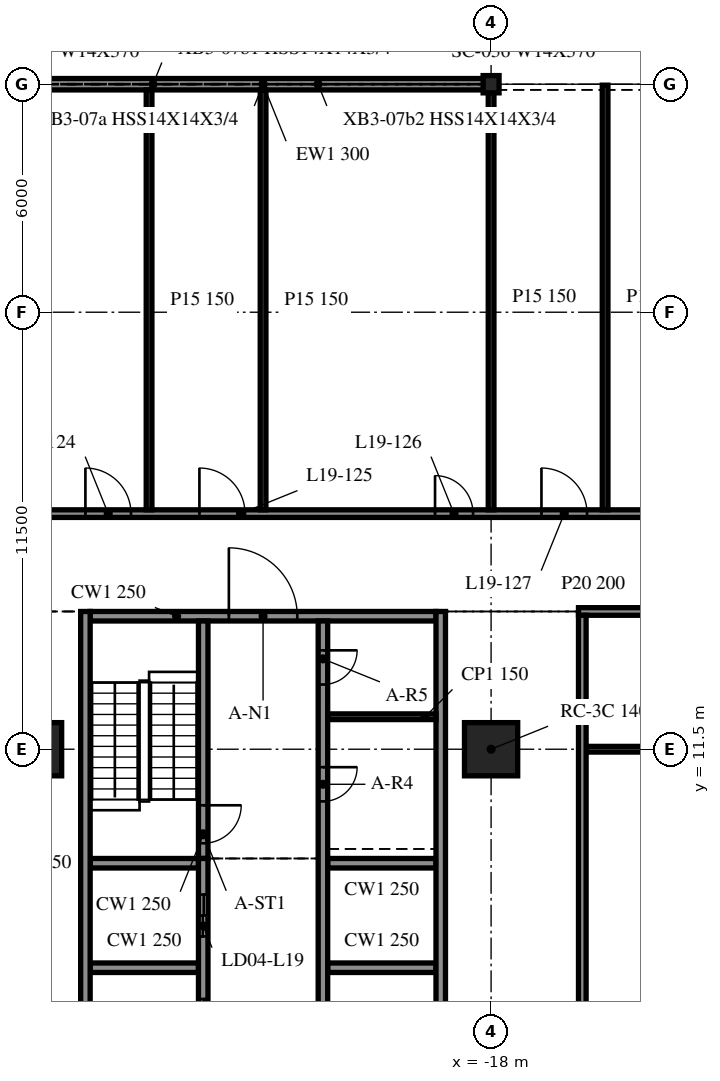
"""IFC4 building model, lengths in metres.
Left out: names, types, materials, properties, quantities, classifications, styles, units other than length and angle.
Written with IfcOpenShell. Run it as: python <this file> out.ifc"""

import sys

from ifc_helpers import new_model, si_unit, direction, frame, frame_2d, origin, origin_2d, place, context, subcontext, project, spatial, rectangle, i_section, extrude, element, fill, save


model = new_model("IFC4")
c1 = context("Model", 3, precision=1e-05, world=origin(), true_north=direction((0.0, 1.0)))
c2 = subcontext(c1, "Body", "Model", "MODEL_VIEW")
j1 = project(units=[si_unit("LENGTHUNIT", "METRE"), si_unit("PLANEANGLEUNIT", "RADIAN")], contexts=[c1])
p1 = place(None, origin())
s1 = spatial("IfcSite", under=j1, at=p1, CompositionType="ELEMENT")
p2 = place(p1, origin())
s2 = spatial("IfcBuilding", under=s1, at=p2, CompositionType="ELEMENT")
p3 = place(p2, frame((0.0, 0.0, 84.8)))
s3 = spatial("IfcBuildingStorey", under=s2, at=p3, CompositionType="ELEMENT", Elevation=84.8)
for number, where, z_axis, x_axis in (
    (1, (-30.0, 11.5, -0.34), (0.0, 0.0, 1.0), (1.0, 0.0, 0.0)),
    (2, (-18.0, 11.5, -0.34), (0.0, 0.0, 1.0), (1.0, 0.0, 0.0)),
):
    element("IfcColumn", number, at=place(p3, frame(where, z_axis=z_axis, x_axis=x_axis)), inside=s3, PredefinedType="COLUMN", context=c2, shape_type="SweptSolid", body=[
        extrude(rectangle(XDim=1.4, YDim=1.4, at=origin_2d()), origin(), (0.0, 0.0, 1.0), 4.1),
    ])
p4 = place(p3, frame((-18.0, 29.0, -0.34), z_axis=(0.0, 0.0, 1.0), x_axis=(1.0, 0.0, 0.0)))
e3 = element("IfcColumn", 3, at=p4, inside=s3, PredefinedType="COLUMN", context=c2, shape_type="SweptSolid", body=[
    extrude(i_section(OverallWidth=0.419, OverallDepth=0.455, WebThickness=0.042, FlangeThickness=0.068, at=origin_2d()), origin(), (0.0, 0.0, 1.0), 4.1),
])
p5 = place(p3, frame((-18.021, 29.0, 0.0), z_axis=(0.0, 0.0, 1.0), x_axis=(-1.0, 0.0, 0.0)))
e4 = element("IfcWall", 4, at=p5, inside=s3, PredefinedType="NOTDEFINED", context=c2, shape_type="SweptSolid", body=[
    extrude(rectangle(XDim=11.958, YDim=0.3, at=frame_2d((5.979, 0.0))), origin(), (0.0, 0.0, 1.0), 3.003),
])
for number, where, z_axis, x_axis in (
    (5, (-28.675, 15.125, 0.0), (0.0, 0.0, 1.0), (0.0, -1.0, 0.0)),
    (6, (-19.325, -9.125, 0.0), (0.0, 0.0, 1.0), (0.0, 1.0, 0.0)),
):
    element("IfcWall", number, at=place(p3, frame(where, z_axis=z_axis, x_axis=x_axis)), inside=s3, PredefinedType="SOLIDWALL", context=c2, shape_type="SweptSolid", body=[
        extrude(rectangle(XDim=24.25, YDim=0.25, at=frame_2d((12.125, 0.0))), origin(), (0.0, 0.0, 1.0), 3.76),
    ])
p6 = place(p3, frame((-28.55, 15.0, 0.0), z_axis=(0.0, 0.0, 1.0), x_axis=(1.0, 0.0, 0.0)))
e7 = element("IfcWall", 7, at=p6, inside=s3, PredefinedType="SOLIDWALL", context=c2, shape_type="SweptSolid", body=[
    extrude(rectangle(XDim=9.1, YDim=0.25, at=frame_2d((4.55, 0.0))), origin(), (0.0, 0.0, 1.0), 3.76),
])
p7 = place(p6, frame((3.65, 0.0, 0.0)))
e8 = element("IfcOpeningElement", 8, at=p7, cuts=e7, PredefinedType="OPENING", context=c2, shape_type="SweptSolid", body=[
    extrude(rectangle(XDim=1.8, YDim=2.1, at=frame_2d((0.9, 1.05))), frame((0.0, 0.135, 0.0), z_axis=(0.0, -1.0, 0.0), x_axis=(1.0, 0.0, 0.0)), (0.0, 0.0, 1.0), 0.27),
])
p8 = place(p3, frame((-25.575, -8.875, 0.0), z_axis=(0.0, 0.0, 1.0), x_axis=(0.0, 1.0, 0.0)))
e9 = element("IfcWall", 9, at=p8, inside=s3, PredefinedType="SOLIDWALL", context=c2, shape_type="SweptSolid", body=[
    extrude(rectangle(XDim=17.5, YDim=0.25, at=frame_2d((8.75, 0.0))), origin(), (0.0, 0.0, 1.0), 3.76),
])
p9 = place(p8, frame((7.2, 0.0, 0.0)))
e10 = element("IfcOpeningElement", 10, at=p9, cuts=e9, PredefinedType="OPENING", context=c2, shape_type="SweptSolid", body=[
    extrude(rectangle(XDim=1.1, YDim=2.1, at=frame_2d((0.55, 1.05))), frame((0.0, 0.135, 0.0), z_axis=(0.0, -1.0, 0.0), x_axis=(1.0, 0.0, 0.0)), (0.0, 0.0, 1.0), 0.27),
])
p10 = place(p8, frame((9.95, 0.0, 0.0)))
e11 = element("IfcOpeningElement", 11, at=p10, cuts=e9, PredefinedType="OPENING", context=c2, shape_type="SweptSolid", body=[
    extrude(rectangle(XDim=1.1, YDim=2.1, at=frame_2d((0.55, 1.05))), frame((0.0, 0.135, 0.0), z_axis=(0.0, -1.0, 0.0), x_axis=(1.0, 0.0, 0.0)), (0.0, 0.0, 1.0), 0.27),
])
p11 = place(p8, frame((12.7, 0.0, 0.0)))
e12 = element("IfcOpeningElement", 12, at=p11, cuts=e9, PredefinedType="OPENING", context=c2, shape_type="SweptSolid", body=[
    extrude(rectangle(XDim=1.1, YDim=2.1, at=frame_2d((0.55, 1.05))), frame((0.0, 0.135, 0.0), z_axis=(0.0, -1.0, 0.0), x_axis=(1.0, 0.0, 0.0)), (0.0, 0.0, 1.0), 0.27),
])
p12 = place(p8, frame((15.45, 0.0, 0.0)))
e13 = element("IfcOpeningElement", 13, at=p12, cuts=e9, PredefinedType="OPENING", context=c2, shape_type="SweptSolid", body=[
    extrude(rectangle(XDim=1.1, YDim=2.1, at=frame_2d((0.55, 1.05))), frame((0.0, 0.135, 0.0), z_axis=(0.0, -1.0, 0.0), x_axis=(1.0, 0.0, 0.0)), (0.0, 0.0, 1.0), 0.27),
])
p13 = place(p8, frame((1.012, 0.0, 0.0)))
e14 = element("IfcOpeningElement", 14, at=p13, cuts=e9, PredefinedType="OPENING", context=c2, shape_type="SweptSolid", body=[
    extrude(rectangle(XDim=0.9, YDim=2.1, at=frame_2d((0.45, 1.05))), frame((0.0, 0.135, 0.0), z_axis=(0.0, -1.0, 0.0), x_axis=(1.0, 0.0, 0.0)), (0.0, 0.0, 1.0), 0.27),
])
p14 = place(p8, frame((4.087, 0.0, 0.0)))
e15 = element("IfcOpeningElement", 15, at=p14, cuts=e9, PredefinedType="OPENING", context=c2, shape_type="SweptSolid", body=[
    extrude(rectangle(XDim=0.9, YDim=2.1, at=frame_2d((0.45, 1.05))), frame((0.0, 0.135, 0.0), z_axis=(0.0, -1.0, 0.0), x_axis=(1.0, 0.0, 0.0)), (0.0, 0.0, 1.0), 0.27),
])
p15 = place(p3, frame((-25.575, 14.875, 0.0), z_axis=(0.0, 0.0, 1.0), x_axis=(0.0, -1.0, 0.0)))
e16 = element("IfcWall", 16, at=p15, inside=s3, PredefinedType="SOLIDWALL", context=c2, shape_type="SweptSolid", body=[
    extrude(rectangle(XDim=6.25, YDim=0.25, at=frame_2d((3.125, 0.0))), origin(), (0.0, 0.0, 1.0), 3.76),
])
p16 = place(p15, frame((4.85, 0.0, 0.0)))
e17 = element("IfcOpeningElement", 17, at=p16, cuts=e16, PredefinedType="OPENING", context=c2, shape_type="SweptSolid", body=[
    extrude(rectangle(XDim=1.0, YDim=2.1, at=frame_2d((0.5, 1.05))), frame((0.0, 0.135, 0.0), z_axis=(0.0, -1.0, 0.0), x_axis=(1.0, 0.0, 0.0)), (0.0, 0.0, 1.0), 0.27),
])
p17 = place(p3, frame((-22.425, 14.875, 0.0), z_axis=(0.0, 0.0, 1.0), x_axis=(0.0, -1.0, 0.0)))
e18 = element("IfcWall", 18, at=p17, inside=s3, PredefinedType="SOLIDWALL", context=c2, shape_type="SweptSolid", body=[
    extrude(rectangle(XDim=23.75, YDim=0.25, at=frame_2d((11.875, 0.0))), origin(), (0.0, 0.0, 1.0), 3.76),
])
p18 = place(p17, frame((15.45, 0.0, 0.0)))
e19 = element("IfcOpeningElement", 19, at=p18, cuts=e18, PredefinedType="OPENING", context=c2, shape_type="SweptSolid", body=[
    extrude(rectangle(XDim=1.1, YDim=2.1, at=frame_2d((0.55, 1.05))), frame((0.0, 0.135, 0.0), z_axis=(0.0, -1.0, 0.0), x_axis=(1.0, 0.0, 0.0)), (0.0, 0.0, 1.0), 0.27),
])
p19 = place(p17, frame((12.7, 0.0, 0.0)))
e20 = element("IfcOpeningElement", 20, at=p19, cuts=e18, PredefinedType="OPENING", context=c2, shape_type="SweptSolid", body=[
    extrude(rectangle(XDim=1.1, YDim=2.1, at=frame_2d((0.55, 1.05))), frame((0.0, 0.135, 0.0), z_axis=(0.0, -1.0, 0.0), x_axis=(1.0, 0.0, 0.0)), (0.0, 0.0, 1.0), 0.27),
])
p20 = place(p17, frame((20.3, 0.0, 0.0)))
e21 = element("IfcOpeningElement", 21, at=p20, cuts=e18, PredefinedType="OPENING", context=c2, shape_type="SweptSolid", body=[
    extrude(rectangle(XDim=0.9, YDim=2.1, at=frame_2d((0.45, 1.05))), frame((0.0, 0.135, 0.0), z_axis=(0.0, -1.0, 0.0), x_axis=(1.0, 0.0, 0.0)), (0.0, 0.0, 1.0), 0.27),
])
p21 = place(p17, frame((3.847, 0.0, 0.0)))
e22 = element("IfcOpeningElement", 22, at=p21, cuts=e18, PredefinedType="OPENING", context=c2, shape_type="SweptSolid", body=[
    extrude(rectangle(XDim=0.9, YDim=2.1, at=frame_2d((0.45, 1.05))), frame((0.0, 0.135, 0.0), z_axis=(0.0, -1.0, 0.0), x_axis=(1.0, 0.0, 0.0)), (0.0, 0.0, 1.0), 0.27),
])
p22 = place(p17, frame((0.772, 0.0, 0.0)))
e23 = element("IfcOpeningElement", 23, at=p22, cuts=e18, PredefinedType="OPENING", context=c2, shape_type="SweptSolid", body=[
    extrude(rectangle(XDim=0.9, YDim=2.1, at=frame_2d((0.45, 1.05))), frame((0.0, 0.135, 0.0), z_axis=(0.0, -1.0, 0.0), x_axis=(1.0, 0.0, 0.0)), (0.0, 0.0, 1.0), 0.27),
])
for number, where, z_axis, x_axis in (
    (24, (-28.55, 5.75, 0.0), (0.0, 0.0, 1.0), (1.0, 0.0, 0.0)),
    (25, (-28.55, 8.5, 0.0), (0.0, 0.0, 1.0), (1.0, 0.0, 0.0)),
    (26, (-22.3, 5.75, 0.0), (0.0, 0.0, 1.0), (1.0, 0.0, 0.0)),
    (27, (-22.3, 8.5, 0.0), (0.0, 0.0, 1.0), (1.0, 0.0, 0.0)),
):
    element("IfcWall", number, at=place(p3, frame(where, z_axis=z_axis, x_axis=x_axis)), inside=s3, PredefinedType="SOLIDWALL", context=c2, shape_type="SweptSolid", body=[
        extrude(rectangle(XDim=2.85, YDim=0.25, at=frame_2d((1.425, 0.0))), origin(), (0.0, 0.0, 1.0), 3.76),
    ])
p23 = place(p3, frame((-22.3, 12.355, 0.0), z_axis=(0.0, 0.0, 1.0), x_axis=(1.0, 0.0, 0.0)))
e28 = element("IfcWall", 28, at=p23, inside=s3, PredefinedType="PARTITIONING", context=c2, shape_type="SweptSolid", body=[
    extrude(rectangle(XDim=2.85, YDim=0.15, at=frame_2d((1.425, 0.0))), origin(), (0.0, 0.0, 1.0), 3.76),
])
p24 = place(p3, frame((-15.5, 11.5, 0.0), z_axis=(0.0, 0.0, 1.0), x_axis=(1.0, 0.0, 0.0)))
e29 = element("IfcWall", 29, at=p24, inside=s3, PredefinedType="PARTITIONING", context=c2, shape_type="SweptSolid", body=[
    extrude(rectangle(XDim=6.9, YDim=0.15, at=frame_2d((3.45, 0.0))), origin(), (0.0, 0.0, 1.0), 3.76),
])
p25 = place(p3, frame((-15.7, 15.125, 0.0), z_axis=(0.0, 0.0, 1.0), x_axis=(1.0, 0.0, 0.0)))
e30 = element("IfcWall", 30, at=p25, inside=s3, PredefinedType="PARTITIONING", context=c2, shape_type="SweptSolid", body=[
    extrude(rectangle(XDim=7.3, YDim=0.2, at=frame_2d((3.65, 0.0))), origin(), (0.0, 0.0, 1.0), 3.76),
])
p26 = place(p25, frame((3.1, 0.0, 0.0)))
e31 = element("IfcOpeningElement", 31, at=p26, cuts=e30, PredefinedType="OPENING", context=c2, shape_type="SweptSolid", body=[
    extrude(rectangle(XDim=0.9, YDim=2.1, at=frame_2d((0.45, 1.05))), frame((0.0, 0.11, 0.0), z_axis=(0.0, -1.0, 0.0), x_axis=(1.0, 0.0, 0.0)), (0.0, 0.0, 1.0), 0.22),
])
p27 = place(p3, frame((-41.975, 17.7, 0.0), z_axis=(0.0, 0.0, 1.0), x_axis=(1.0, 0.0, 0.0)))
e32 = element("IfcWall", 32, at=p27, inside=s3, PredefinedType="PARTITIONING", context=c2, shape_type="SweptSolid", body=[
    extrude(rectangle(XDim=95.95, YDim=0.2, at=frame_2d((47.975, 0.0))), origin(), (0.0, 0.0, 1.0), 3.76),
])
p28 = place(p27, frame((4.5, 0.0, 0.0)))
e33 = element("IfcOpeningElement", 33, at=p28, cuts=e32, PredefinedType="OPENING", context=c2, shape_type="SweptSolid", body=[
    extrude(rectangle(XDim=1.0, YDim=2.1, at=frame_2d((0.5, 1.05))), frame((0.0, 0.11, 0.0), z_axis=(0.0, -1.0, 0.0), x_axis=(1.0, 0.0, 0.0)), (0.0, 0.0, 1.0), 0.22),
])
p29 = place(p27, frame((13.3, 0.0, 0.0)))
e34 = element("IfcOpeningElement", 34, at=p29, cuts=e32, PredefinedType="OPENING", context=c2, shape_type="SweptSolid", body=[
    extrude(rectangle(XDim=1.2, YDim=2.1, at=frame_2d((0.6, 1.05))), frame((0.0, 0.11, 0.0), z_axis=(0.0, -1.0, 0.0), x_axis=(1.0, 0.0, 0.0)), (0.0, 0.0, 1.0), 0.22),
])
p30 = place(p27, frame((16.3, 0.0, 0.0)))
e35 = element("IfcOpeningElement", 35, at=p30, cuts=e32, PredefinedType="OPENING", context=c2, shape_type="SweptSolid", body=[
    extrude(rectangle(XDim=1.2, YDim=2.1, at=frame_2d((0.6, 1.05))), frame((0.0, 0.11, 0.0), z_axis=(0.0, -1.0, 0.0), x_axis=(1.0, 0.0, 0.0)), (0.0, 0.0, 1.0), 0.22),
])
p31 = place(p27, frame((22.5, 0.0, 0.0)))
e36 = element("IfcOpeningElement", 36, at=p31, cuts=e32, PredefinedType="OPENING", context=c2, shape_type="SweptSolid", body=[
    extrude(rectangle(XDim=1.0, YDim=2.1, at=frame_2d((0.5, 1.05))), frame((0.0, 0.11, 0.0), z_axis=(0.0, -1.0, 0.0), x_axis=(1.0, 0.0, 0.0)), (0.0, 0.0, 1.0), 0.22),
])
p32 = place(p27, frame((25.3, 0.0, 0.0)))
e37 = element("IfcOpeningElement", 37, at=p32, cuts=e32, PredefinedType="OPENING", context=c2, shape_type="SweptSolid", body=[
    extrude(rectangle(XDim=1.2, YDim=2.1, at=frame_2d((0.6, 1.05))), frame((0.0, 0.11, 0.0), z_axis=(0.0, -1.0, 0.0), x_axis=(1.0, 0.0, 0.0)), (0.0, 0.0, 1.0), 0.22),
])
p33 = place(p27, frame((34.3, 0.0, 0.0)))
e38 = element("IfcOpeningElement", 38, at=p33, cuts=e32, PredefinedType="OPENING", context=c2, shape_type="SweptSolid", body=[
    extrude(rectangle(XDim=1.2, YDim=2.1, at=frame_2d((0.6, 1.05))), frame((0.0, 0.11, 0.0), z_axis=(0.0, -1.0, 0.0), x_axis=(1.0, 0.0, 0.0)), (0.0, 0.0, 1.0), 0.22),
])
p34 = place(p27, frame((42.7, 0.0, 0.0)))
e39 = element("IfcOpeningElement", 39, at=p34, cuts=e32, PredefinedType="OPENING", context=c2, shape_type="SweptSolid", body=[
    extrude(rectangle(XDim=1.0, YDim=2.1, at=frame_2d((0.5, 1.05))), frame((0.0, 0.11, 0.0), z_axis=(0.0, -1.0, 0.0), x_axis=(1.0, 0.0, 0.0)), (0.0, 0.0, 1.0), 0.22),
])
p35 = place(p27, frame((47.3, 0.0, 0.0)))
e40 = element("IfcOpeningElement", 40, at=p35, cuts=e32, PredefinedType="OPENING", context=c2, shape_type="SweptSolid", body=[
    extrude(rectangle(XDim=1.2, YDim=2.1, at=frame_2d((0.6, 1.05))), frame((0.0, 0.11, 0.0), z_axis=(0.0, -1.0, 0.0), x_axis=(1.0, 0.0, 0.0)), (0.0, 0.0, 1.0), 0.22),
])
p36 = place(p27, frame((51.1, 0.0, 0.0)))
e41 = element("IfcOpeningElement", 41, at=p36, cuts=e32, PredefinedType="OPENING", context=c2, shape_type="SweptSolid", body=[
    extrude(rectangle(XDim=1.2, YDim=2.1, at=frame_2d((0.6, 1.05))), frame((0.0, 0.11, 0.0), z_axis=(0.0, -1.0, 0.0), x_axis=(1.0, 0.0, 0.0)), (0.0, 0.0, 1.0), 0.22),
])
p37 = place(p27, frame((54.1, 0.0, 0.0)))
e42 = element("IfcOpeningElement", 42, at=p37, cuts=e32, PredefinedType="OPENING", context=c2, shape_type="SweptSolid", body=[
    extrude(rectangle(XDim=1.0, YDim=2.1, at=frame_2d((0.5, 1.05))), frame((0.0, 0.11, 0.0), z_axis=(0.0, -1.0, 0.0), x_axis=(1.0, 0.0, 0.0)), (0.0, 0.0, 1.0), 0.22),
])
p38 = place(p27, frame((60.1, 0.0, 0.0)))
e43 = element("IfcOpeningElement", 43, at=p38, cuts=e32, PredefinedType="OPENING", context=c2, shape_type="SweptSolid", body=[
    extrude(rectangle(XDim=1.2, YDim=2.1, at=frame_2d((0.6, 1.05))), frame((0.0, 0.11, 0.0), z_axis=(0.0, -1.0, 0.0), x_axis=(1.0, 0.0, 0.0)), (0.0, 0.0, 1.0), 0.22),
])
p39 = place(p27, frame((63.1, 0.0, 0.0)))
e44 = element("IfcOpeningElement", 44, at=p39, cuts=e32, PredefinedType="OPENING", context=c2, shape_type="SweptSolid", body=[
    extrude(rectangle(XDim=1.2, YDim=2.1, at=frame_2d((0.6, 1.05))), frame((0.0, 0.11, 0.0), z_axis=(0.0, -1.0, 0.0), x_axis=(1.0, 0.0, 0.0)), (0.0, 0.0, 1.0), 0.22),
])
p40 = place(p27, frame((72.1, 0.0, 0.0)))
e45 = element("IfcOpeningElement", 45, at=p40, cuts=e32, PredefinedType="OPENING", context=c2, shape_type="SweptSolid", body=[
    extrude(rectangle(XDim=1.0, YDim=2.1, at=frame_2d((0.5, 1.05))), frame((0.0, 0.11, 0.0), z_axis=(0.0, -1.0, 0.0), x_axis=(1.0, 0.0, 0.0)), (0.0, 0.0, 1.0), 0.22),
])
p41 = place(p27, frame((78.1, 0.0, 0.0)))
e46 = element("IfcOpeningElement", 46, at=p41, cuts=e32, PredefinedType="OPENING", context=c2, shape_type="SweptSolid", body=[
    extrude(rectangle(XDim=1.2, YDim=2.1, at=frame_2d((0.6, 1.05))), frame((0.0, 0.11, 0.0), z_axis=(0.0, -1.0, 0.0), x_axis=(1.0, 0.0, 0.0)), (0.0, 0.0, 1.0), 0.22),
])
p42 = place(p27, frame((87.1, 0.0, 0.0)))
e47 = element("IfcOpeningElement", 47, at=p42, cuts=e32, PredefinedType="OPENING", context=c2, shape_type="SweptSolid", body=[
    extrude(rectangle(XDim=1.2, YDim=2.1, at=frame_2d((0.6, 1.05))), frame((0.0, 0.11, 0.0), z_axis=(0.0, -1.0, 0.0), x_axis=(1.0, 0.0, 0.0)), (0.0, 0.0, 1.0), 0.22),
])
p43 = place(p27, frame((90.1, 0.0, 0.0)))
e48 = element("IfcOpeningElement", 48, at=p43, cuts=e32, PredefinedType="OPENING", context=c2, shape_type="SweptSolid", body=[
    extrude(rectangle(XDim=1.0, YDim=2.1, at=frame_2d((0.5, 1.05))), frame((0.0, 0.11, 0.0), z_axis=(0.0, -1.0, 0.0), x_axis=(1.0, 0.0, 0.0)), (0.0, 0.0, 1.0), 0.22),
])
for number, where, z_axis, x_axis in (
    (49, (-27.0, 17.8, 0.0), (0.0, 0.0, 1.0), (0.0, 1.0, 0.0)),
    (50, (-24.0, 17.8, 0.0), (0.0, 0.0, 1.0), (0.0, 1.0, 0.0)),
):
    element("IfcWall", number, at=place(p3, frame(where, z_axis=z_axis, x_axis=x_axis)), inside=s3, PredefinedType="PARTITIONING", context=c2, shape_type="SweptSolid", body=[
        extrude(rectangle(XDim=11.05, YDim=0.15, at=frame_2d((5.525, 0.0))), origin(), (0.0, 0.0, 1.0), 3.76),
    ])
p44 = place(p3, frame((-18.0, 17.8, 0.0), z_axis=(0.0, 0.0, 1.0), x_axis=(0.0, 1.0, 0.0)))
e51 = element("IfcWall", 51, at=p44, inside=s3, PredefinedType="PARTITIONING", context=c2, shape_type="SweptSolid", body=[
    extrude(rectangle(XDim=11.175, YDim=0.15, at=frame_2d((5.587, 0.0))), origin(), (0.0, 0.0, 1.0), 3.76),
])
p45 = place(p3, frame((-15.6, -9.025, 0.0), z_axis=(0.0, 0.0, 1.0), x_axis=(0.0, 1.0, 0.0)))
e52 = element("IfcWall", 52, at=p45, inside=s3, PredefinedType="PARTITIONING", context=c2, shape_type="SweptSolid", body=[
    extrude(rectangle(XDim=24.05, YDim=0.2, at=frame_2d((12.025, 0.0))), origin(), (0.0, 0.0, 1.0), 3.76),
])
p46 = place(p45, frame((11.5, 0.0, 0.0)))
e53 = element("IfcOpeningElement", 53, at=p46, cuts=e52, PredefinedType="OPENING", context=c2, shape_type="SweptSolid", body=[
    extrude(rectangle(XDim=0.9, YDim=2.1, at=frame_2d((0.45, 1.05))), frame((0.0, 0.11, 0.0), z_axis=(0.0, -1.0, 0.0), x_axis=(1.0, 0.0, 0.0)), (0.0, 0.0, 1.0), 0.22),
])
p47 = place(p3, frame((-15.0, 17.8, 0.0), z_axis=(0.0, 0.0, 1.0), x_axis=(0.0, 1.0, 0.0)))
e54 = element("IfcWall", 54, at=p47, inside=s3, PredefinedType="PARTITIONING", context=c2, shape_type="SweptSolid", body=[
    extrude(rectangle(XDim=11.175, YDim=0.15, at=frame_2d((5.587, 0.0))), origin(), (0.0, 0.0, 1.0), 3.76),
])
p48 = place(p7, origin())
e55 = element("IfcDoor", 55, at=p48, inside=s3, OperationType="DOUBLE_DOOR_SINGLE_SWING", PredefinedType="DOOR", context=c2, shape_type="SweptSolid", body=[
    extrude(rectangle(XDim=1.8, YDim=2.1, at=frame_2d((0.9, 1.05))), frame((0.0, 0.025, 0.0), z_axis=(0.0, -1.0, 0.0), x_axis=(1.0, 0.0, 0.0)), (0.0, 0.0, 1.0), 0.05),
])
fill(e8, e55)
p49 = place(p11, origin())
e56 = element("IfcDoor", 56, at=p49, inside=s3, OperationType="DOUBLE_DOOR_SLIDING", PredefinedType="DOOR", context=c2, shape_type="SweptSolid", body=[
    extrude(rectangle(XDim=1.1, YDim=2.1, at=frame_2d((0.55, 1.05))), frame((0.0, 0.025, 0.0), z_axis=(0.0, -1.0, 0.0), x_axis=(1.0, 0.0, 0.0)), (0.0, 0.0, 1.0), 0.05),
])
fill(e12, e56)
p50 = place(p12, origin())
e57 = element("IfcDoor", 57, at=p50, inside=s3, OperationType="DOUBLE_DOOR_SLIDING", PredefinedType="DOOR", context=c2, shape_type="SweptSolid", body=[
    extrude(rectangle(XDim=1.1, YDim=2.1, at=frame_2d((0.55, 1.05))), frame((0.0, 0.025, 0.0), z_axis=(0.0, -1.0, 0.0), x_axis=(1.0, 0.0, 0.0)), (0.0, 0.0, 1.0), 0.05),
])
fill(e13, e57)
p51 = place(p21, origin())
e58 = element("IfcDoor", 58, at=p51, inside=s3, OperationType="SINGLE_SWING_RIGHT", PredefinedType="DOOR", context=c2, shape_type="SweptSolid", body=[
    extrude(rectangle(XDim=0.9, YDim=2.1, at=frame_2d((0.45, 1.05))), frame((0.0, 0.025, 0.0), z_axis=(0.0, -1.0, 0.0), x_axis=(1.0, 0.0, 0.0)), (0.0, 0.0, 1.0), 0.05),
])
fill(e22, e58)
p52 = place(p22, origin())
e59 = element("IfcDoor", 59, at=p52, inside=s3, OperationType="SINGLE_SWING_LEFT", PredefinedType="DOOR", context=c2, shape_type="SweptSolid", body=[
    extrude(rectangle(XDim=0.9, YDim=2.1, at=frame_2d((0.45, 1.05))), frame((0.0, 0.025, 0.0), z_axis=(0.0, -1.0, 0.0), x_axis=(1.0, 0.0, 0.0)), (0.0, 0.0, 1.0), 0.05),
])
fill(e23, e59)
p53 = place(p16, origin())
e60 = element("IfcDoor", 60, at=p53, inside=s3, OperationType="SINGLE_SWING_RIGHT", PredefinedType="DOOR", context=c2, shape_type="SweptSolid", body=[
    extrude(rectangle(XDim=1.0, YDim=2.1, at=frame_2d((0.5, 1.05))), frame((0.0, 0.025, 0.0), z_axis=(0.0, -1.0, 0.0), x_axis=(1.0, 0.0, 0.0)), (0.0, 0.0, 1.0), 0.05),
])
fill(e17, e60)
p54 = place(p29, origin())
e61 = element("IfcDoor", 61, at=p54, inside=s3, OperationType="SINGLE_SWING_LEFT", PredefinedType="DOOR", context=c2, shape_type="SweptSolid", body=[
    extrude(rectangle(XDim=1.2, YDim=2.1, at=frame_2d((0.6, 1.05))), frame((0.0, 0.025, 0.0), z_axis=(0.0, -1.0, 0.0), x_axis=(1.0, 0.0, 0.0)), (0.0, 0.0, 1.0), 0.05),
])
fill(e34, e61)
p55 = place(p30, origin())
e62 = element("IfcDoor", 62, at=p55, inside=s3, OperationType="SINGLE_SWING_LEFT", PredefinedType="DOOR", context=c2, shape_type="SweptSolid", body=[
    extrude(rectangle(XDim=1.2, YDim=2.1, at=frame_2d((0.6, 1.05))), frame((0.0, 0.025, 0.0), z_axis=(0.0, -1.0, 0.0), x_axis=(1.0, 0.0, 0.0)), (0.0, 0.0, 1.0), 0.05),
])
fill(e35, e62)
p56 = place(p31, origin())
e63 = element("IfcDoor", 63, at=p56, inside=s3, OperationType="SINGLE_SWING_LEFT", PredefinedType="DOOR", context=c2, shape_type="SweptSolid", body=[
    extrude(rectangle(XDim=1.0, YDim=2.1, at=frame_2d((0.5, 1.05))), frame((0.0, 0.025, 0.0), z_axis=(0.0, -1.0, 0.0), x_axis=(1.0, 0.0, 0.0)), (0.0, 0.0, 1.0), 0.05),
])
fill(e36, e63)
p57 = place(p32, origin())
e64 = element("IfcDoor", 64, at=p57, inside=s3, OperationType="SINGLE_SWING_LEFT", PredefinedType="DOOR", context=c2, shape_type="SweptSolid", body=[
    extrude(rectangle(XDim=1.2, YDim=2.1, at=frame_2d((0.6, 1.05))), frame((0.0, 0.025, 0.0), z_axis=(0.0, -1.0, 0.0), x_axis=(1.0, 0.0, 0.0)), (0.0, 0.0, 1.0), 0.05),
])
fill(e37, e64)
save(model, sys.argv[1])
